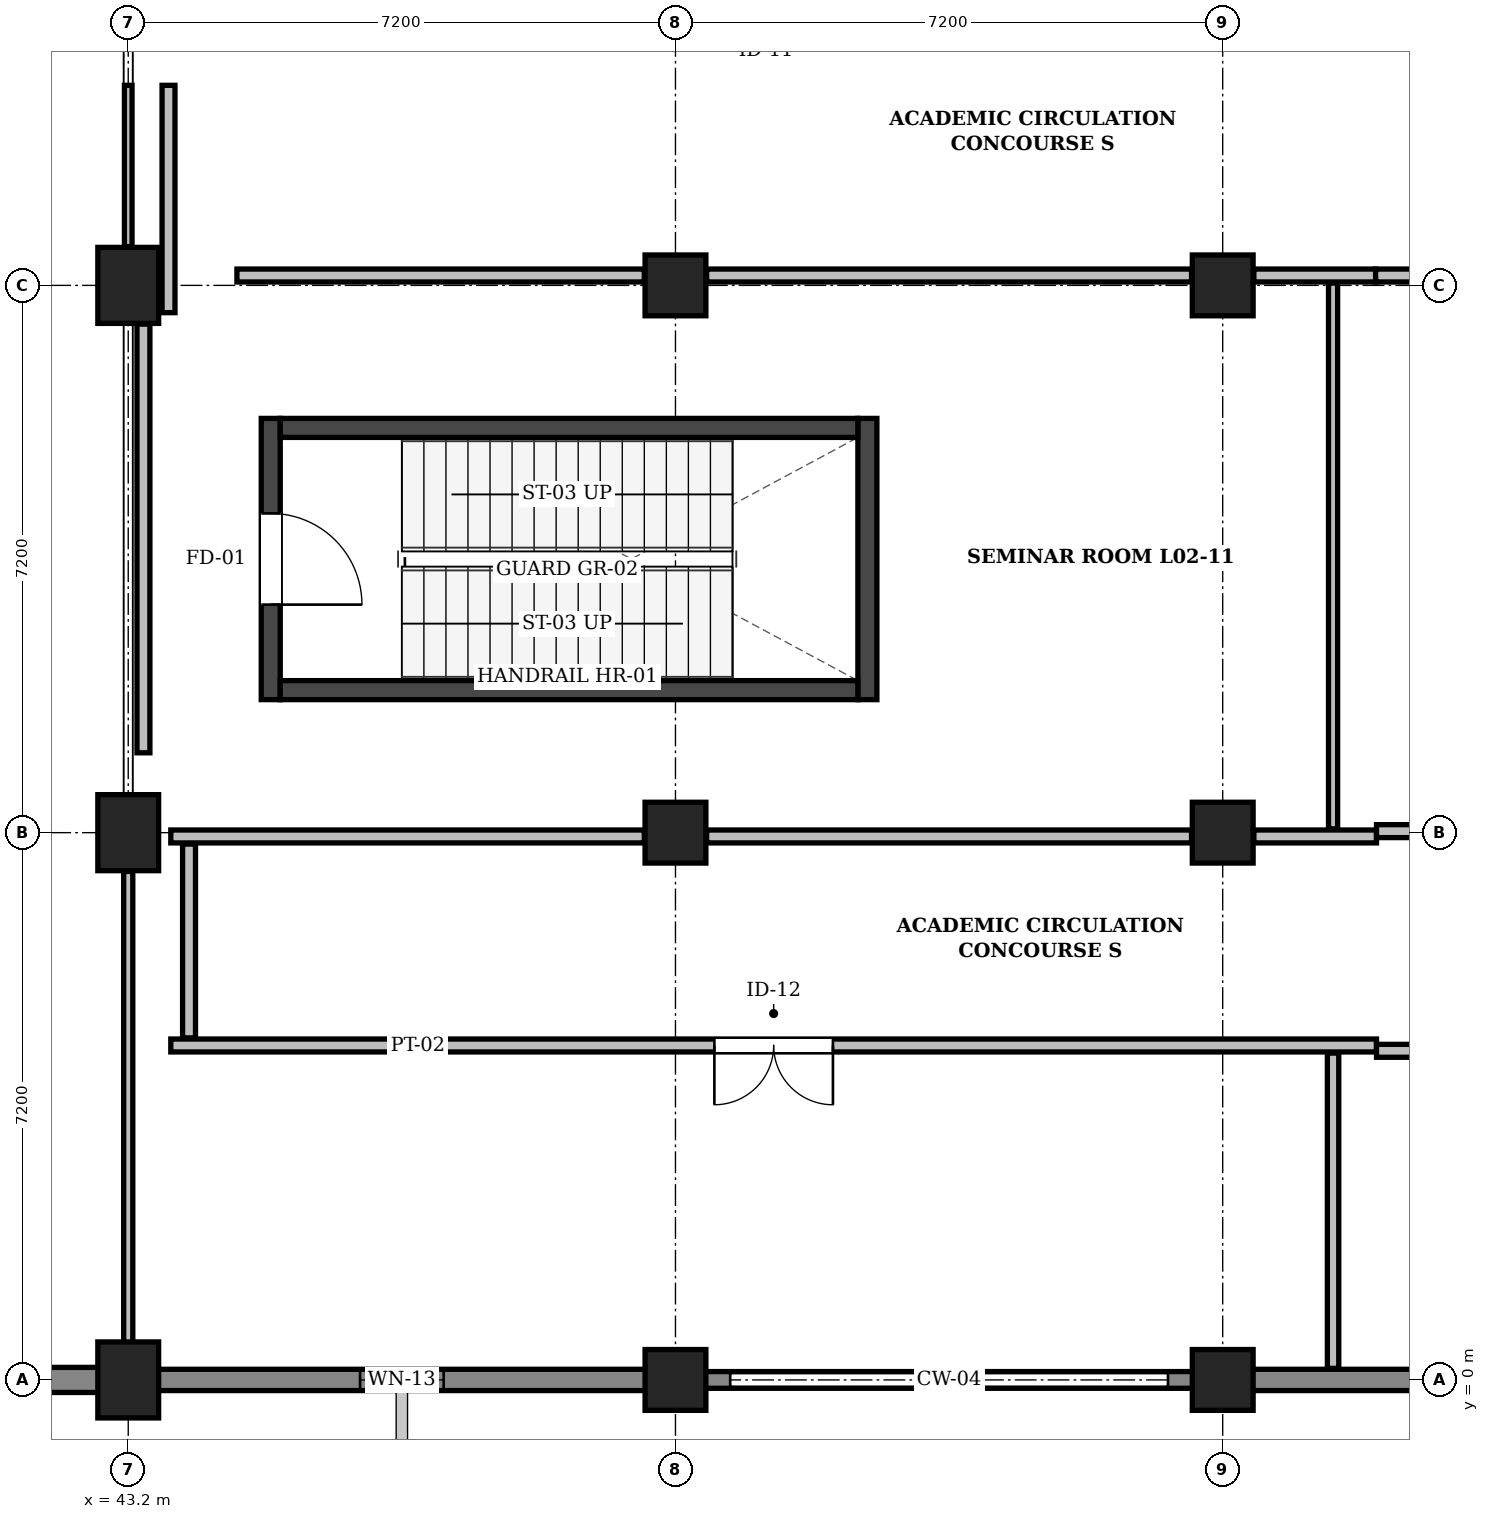
"""IFC4 building model, lengths in metres.
Left out: names, types, materials, properties, quantities, classifications, styles, units other than length and angle.
Written with IfcOpenShell. Run it as: python <this file> out.ifc"""

import sys

from ifc_helpers import new_model, si_unit, direction, frame, frame_2d, origin, origin_2d, place, context, subcontext, project, spatial, rectangle, extrude, element, fill, save


model = new_model("IFC4")
c1 = context("Model", 3, precision=1e-05, world=origin(), true_north=direction((0.0, 1.0)))
c2 = subcontext(c1, "Body", "Model", "MODEL_VIEW")
j1 = project(units=[si_unit("LENGTHUNIT", "METRE"), si_unit("PLANEANGLEUNIT", "RADIAN")], contexts=[c1])
p1 = place(None, origin())
s1 = spatial("IfcSite", under=j1, at=p1, CompositionType="ELEMENT")
p2 = place(p1, origin())
s2 = spatial("IfcBuilding", under=s1, at=p2, CompositionType="ELEMENT")
p3 = place(p2, frame((0.0, 0.0, 9.6)))
s3 = spatial("IfcBuildingStorey", under=s2, at=p3, CompositionType="ELEMENT", Elevation=9.6)
for number, where, z_axis, x_axis in (
    (1, (43.2, 0.0, 0.0), (0.0, 0.0, 1.0), (1.0, 0.0, 0.0)),
    (2, (43.2, 7.2, 0.0), (0.0, 0.0, 1.0), (1.0, 0.0, 0.0)),
    (3, (43.2, 14.4, 0.0), (0.0, 0.0, 1.0), (1.0, 0.0, 0.0)),
):
    element("IfcColumn", number, at=place(p3, frame(where, z_axis=z_axis, x_axis=x_axis)), inside=s3, PredefinedType="COLUMN", context=c2, shape_type="SweptSolid", body=[
        extrude(rectangle(XDim=0.8, YDim=1.0, at=origin_2d()), origin(), (0.0, 0.0, 1.0), 4.8),
    ])
for number, where, z_axis, x_axis in (
    (4, (50.4, 0.0, 0.0), (0.0, 0.0, 1.0), (1.0, 0.0, 0.0)),
    (5, (50.4, 7.2, 0.0), (0.0, 0.0, 1.0), (1.0, 0.0, 0.0)),
    (6, (50.4, 14.4, 0.0), (0.0, 0.0, 1.0), (1.0, 0.0, 0.0)),
    (7, (57.6, 0.0, 0.0), (0.0, 0.0, 1.0), (1.0, 0.0, 0.0)),
    (8, (57.6, 7.2, 0.0), (0.0, 0.0, 1.0), (1.0, 0.0, 0.0)),
    (9, (57.6, 14.4, 0.0), (0.0, 0.0, 1.0), (1.0, 0.0, 0.0)),
):
    element("IfcColumn", number, at=place(p3, frame(where, z_axis=z_axis, x_axis=x_axis)), inside=s3, PredefinedType="COLUMN", context=c2, shape_type="SweptSolid", body=[
        extrude(rectangle(XDim=0.8, YDim=0.8, at=origin_2d()), origin(), (0.0, 0.0, 1.0), 4.8),
    ])
p4 = place(p3, frame((64.8, 0.0, 0.0), z_axis=(0.0, 0.0, 1.0), x_axis=(-1.0, 0.0, 0.0)))
e10 = element("IfcWall", 10, at=p4, inside=s3, PredefinedType="SOLIDWALL", context=c2, shape_type="SweptSolid", body=[
    extrude(rectangle(XDim=7.2, YDim=0.28, at=frame_2d((3.6, 0.0))), origin(), (0.0, 0.0, 1.0), 4.52),
])
p5 = place(p4, frame((1.434, 0.0, 0.95)))
e11 = element("IfcOpeningElement", 11, at=p5, cuts=e10, PredefinedType="OPENING", context=c2, shape_type="SweptSolid", body=[
    extrude(rectangle(XDim=2.9, YDim=1.3, at=frame_2d((1.45, 0.65))), frame((0.0, 0.152, 0.0), z_axis=(0.0, -1.0, 0.0), x_axis=(1.0, 0.0, 0.0)), (0.0, 0.0, 1.0), 0.304),
])
p6 = place(p3, frame((57.6, 0.0, 0.0), z_axis=(0.0, 0.0, 1.0), x_axis=(-1.0, 0.0, 0.0)))
e12 = element("IfcWall", 12, at=p6, inside=s3, PredefinedType="SOLIDWALL", context=c2, shape_type="SweptSolid", body=[
    extrude(rectangle(XDim=7.2, YDim=0.22, at=frame_2d((3.6, 0.0))), origin(), (0.0, 0.0, 1.0), 1.24),
])
p7 = place(p3, frame((50.4, 0.0, 0.0), z_axis=(0.0, 0.0, 1.0), x_axis=(-1.0, 0.0, 0.0)))
e13 = element("IfcWall", 13, at=p7, inside=s3, PredefinedType="SOLIDWALL", context=c2, shape_type="SweptSolid", body=[
    extrude(rectangle(XDim=7.2, YDim=0.28, at=frame_2d((3.6, 0.0))), origin(), (0.0, 0.0, 1.0), 4.52),
])
p8 = place(p7, frame((3.05, 0.0, 0.95)))
e14 = element("IfcOpeningElement", 14, at=p8, cuts=e13, PredefinedType="OPENING", context=c2, shape_type="SweptSolid", body=[
    extrude(rectangle(XDim=1.1, YDim=1.55, at=frame_2d((0.55, 0.775))), frame((0.0, 0.152, 0.0), z_axis=(0.0, -1.0, 0.0), x_axis=(1.0, 0.0, 0.0)), (0.0, 0.0, 1.0), 0.304),
])
p9 = place(p3, frame((43.2, 0.0, 0.0), z_axis=(0.0, 0.0, 1.0), x_axis=(-1.0, 0.0, 0.0)))
e15 = element("IfcWall", 15, at=p9, inside=s3, PredefinedType="SOLIDWALL", context=c2, shape_type="SweptSolid", body=[
    extrude(rectangle(XDim=7.2, YDim=0.33, at=frame_2d((3.6, 0.0))), origin(), (0.0, 0.0, 1.0), 4.52),
])
p10 = place(p3, frame((45.075, 8.95, 0.0), z_axis=(0.0, 0.0, 1.0), x_axis=(0.0, 1.0, 0.0)))
e16 = element("IfcWall", 16, at=p10, inside=s3, PredefinedType="SHEAR", context=c2, shape_type="SweptSolid", body=[
    extrude(rectangle(XDim=3.7, YDim=0.25, at=frame_2d((1.85, 0.0))), origin(), (0.0, 0.0, 1.0), 4.55),
])
p11 = place(p10, frame((1.25, 0.0, 0.0)))
e17 = element("IfcOpeningElement", 17, at=p11, cuts=e16, PredefinedType="OPENING", context=c2, shape_type="SweptSolid", body=[
    extrude(rectangle(XDim=1.2, YDim=2.15, at=frame_2d((0.6, 1.075))), frame((0.0, 0.137, 0.0), z_axis=(0.0, -1.0, 0.0), x_axis=(1.0, 0.0, 0.0)), (0.0, 0.0, 1.0), 0.274),
])
p12 = place(p3, frame((52.925, 8.95, 0.0), z_axis=(0.0, 0.0, 1.0), x_axis=(0.0, 1.0, 0.0)))
e18 = element("IfcWall", 18, at=p12, inside=s3, PredefinedType="SHEAR", context=c2, shape_type="SweptSolid", body=[
    extrude(rectangle(XDim=3.7, YDim=0.25, at=frame_2d((1.85, 0.0))), origin(), (0.0, 0.0, 1.0), 4.55),
])
for number, where, z_axis, x_axis in (
    (19, (45.2, 9.075, 0.0), (0.0, 0.0, 1.0), (1.0, 0.0, 0.0)),
    (20, (45.2, 12.525, 0.0), (0.0, 0.0, 1.0), (1.0, 0.0, 0.0)),
):
    element("IfcWall", number, at=place(p3, frame(where, z_axis=z_axis, x_axis=x_axis)), inside=s3, PredefinedType="SHEAR", context=c2, shape_type="SweptSolid", body=[
        extrude(rectangle(XDim=7.6, YDim=0.25, at=frame_2d((3.8, 0.0))), origin(), (0.0, 0.0, 1.0), 4.55),
    ])
p13 = place(p3, frame((50.81, 14.53, 0.0), z_axis=(0.0, 0.0, 1.0), x_axis=(1.0, 0.0, 0.0)))
e21 = element("IfcWall", 21, at=p13, inside=s3, PredefinedType="PARTITIONING", context=c2, shape_type="SweptSolid", body=[
    extrude(rectangle(XDim=6.38, YDim=0.17, at=frame_2d((3.19, 0.0))), origin(), (0.0, 0.0, 1.0), 3.93),
])
p14 = place(p3, frame((44.63, 14.53, 0.0), z_axis=(0.0, 0.0, 1.0), x_axis=(1.0, 0.0, 0.0)))
e22 = element("IfcWall", 22, at=p14, inside=s3, PredefinedType="PARTITIONING", context=c2, shape_type="SweptSolid", body=[
    extrude(rectangle(XDim=5.36, YDim=0.17, at=frame_2d((2.68, 0.0))), origin(), (0.0, 0.0, 1.0), 3.93),
])
p15 = place(p3, frame((58.01, 14.53, 0.0), z_axis=(0.0, 0.0, 1.0), x_axis=(1.0, 0.0, 0.0)))
e23 = element("IfcWall", 23, at=p15, inside=s3, PredefinedType="PARTITIONING", context=c2, shape_type="SweptSolid", body=[
    extrude(rectangle(XDim=1.602, YDim=0.17, at=frame_2d((0.801, 0.0))), origin(), (0.0, 0.0, 1.0), 3.63),
])
p16 = place(p3, frame((43.73, 14.041, 0.0), z_axis=(0.0, 0.0, 1.0), x_axis=(0.0, 1.0, 0.0)))
e24 = element("IfcWall", 24, at=p16, inside=s3, PredefinedType="PARTITIONING", context=c2, shape_type="SweptSolid", body=[
    extrude(rectangle(XDim=2.991, YDim=0.17, at=frame_2d((1.496, 0.0))), origin(), (0.0, 0.0, 1.0), 4.46),
])
p17 = place(p3, frame((59.612, 14.53, 0.0), z_axis=(0.0, 0.0, 1.0), x_axis=(1.0, 0.0, 0.0)))
e25 = element("IfcWall", 25, at=p17, inside=s3, PredefinedType="PARTITIONING", context=c2, shape_type="SweptSolid", body=[
    extrude(rectangle(XDim=11.978, YDim=0.17, at=frame_2d((5.989, 0.0))), origin(), (0.0, 0.0, 1.0), 3.63),
])
p18 = place(p17, frame((5.029, 0.0, 0.0)))
e26 = element("IfcOpeningElement", 26, at=p18, cuts=e25, PredefinedType="OPENING", context=c2, shape_type="SweptSolid", body=[
    extrude(rectangle(XDim=1.92, YDim=2.32, at=frame_2d((0.96, 1.16))), frame((0.0, 0.097, 0.0), z_axis=(0.0, -1.0, 0.0), x_axis=(1.0, 0.0, 0.0)), (0.0, 0.0, 1.0), 0.194),
])
p19 = place(p3, frame((50.81, 7.15, 0.0), z_axis=(0.0, 0.0, 1.0), x_axis=(1.0, 0.0, 0.0)))
e27 = element("IfcWall", 27, at=p19, inside=s3, PredefinedType="PARTITIONING", context=c2, shape_type="SweptSolid", body=[
    extrude(rectangle(XDim=6.38, YDim=0.17, at=frame_2d((3.19, 0.0))), origin(), (0.0, 0.0, 1.0), 3.93),
])
p20 = place(p3, frame((43.76, 7.15, 0.0), z_axis=(0.0, 0.0, 1.0), x_axis=(1.0, 0.0, 0.0)))
e28 = element("IfcWall", 28, at=p20, inside=s3, PredefinedType="PARTITIONING", context=c2, shape_type="SweptSolid", body=[
    extrude(rectangle(XDim=6.23, YDim=0.17, at=frame_2d((3.115, 0.0))), origin(), (0.0, 0.0, 1.0), 3.93),
])
p21 = place(p3, frame((58.01, 7.15, 0.0), z_axis=(0.0, 0.0, 1.0), x_axis=(1.0, 0.0, 0.0)))
e29 = element("IfcWall", 29, at=p21, inside=s3, PredefinedType="PARTITIONING", context=c2, shape_type="SweptSolid", body=[
    extrude(rectangle(XDim=1.614, YDim=0.17, at=frame_2d((0.807, 0.0))), origin(), (0.0, 0.0, 1.0), 3.93),
])
p22 = place(p3, frame((43.76, 4.4, 0.0), z_axis=(0.0, 0.0, 1.0), x_axis=(1.0, 0.0, 0.0)))
e30 = element("IfcWall", 30, at=p22, inside=s3, PredefinedType="PARTITIONING", context=c2, shape_type="SweptSolid", body=[
    extrude(rectangle(XDim=15.864, YDim=0.17, at=frame_2d((7.932, 0.0))), origin(), (0.0, 0.0, 1.0), 4.46),
])
p23 = place(p22, frame((7.152, 0.0, 0.0)))
e31 = element("IfcOpeningElement", 31, at=p23, cuts=e30, PredefinedType="OPENING", context=c2, shape_type="SweptSolid", body=[
    extrude(rectangle(XDim=1.56, YDim=2.26, at=frame_2d((0.78, 1.13))), frame((0.0, 0.097, 0.0), z_axis=(0.0, -1.0, 0.0), x_axis=(1.0, 0.0, 0.0)), (0.0, 0.0, 1.0), 0.194),
])
p24 = place(p3, frame((44.0, 4.5, 0.0), z_axis=(0.0, 0.0, 1.0), x_axis=(0.0, 1.0, 0.0)))
e32 = element("IfcWall", 32, at=p24, inside=s3, PredefinedType="PARTITIONING", context=c2, shape_type="SweptSolid", body=[
    extrude(rectangle(XDim=2.55, YDim=0.17, at=frame_2d((1.275, 0.0))), origin(), (0.0, 0.0, 1.0), 4.46),
])
p25 = place(p3, frame((59.624, 4.33, 0.0), z_axis=(0.0, 0.0, 1.0), x_axis=(1.0, 0.0, 0.0)))
e33 = element("IfcWall", 33, at=p25, inside=s3, PredefinedType="PARTITIONING", context=c2, shape_type="SweptSolid", body=[
    extrude(rectangle(XDim=17.167, YDim=0.17, at=frame_2d((8.583, 0.0))), origin(), (0.0, 0.0, 1.0), 4.46),
])
p26 = place(p25, frame((7.873, 0.0, 0.0)))
e34 = element("IfcOpeningElement", 34, at=p26, cuts=e33, PredefinedType="OPENING", context=c2, shape_type="SweptSolid", body=[
    extrude(rectangle(XDim=1.42, YDim=2.24, at=frame_2d((0.71, 1.12))), frame((0.0, 0.097, 0.0), z_axis=(0.0, -1.0, 0.0), x_axis=(1.0, 0.0, 0.0)), (0.0, 0.0, 1.0), 0.194),
])
p27 = place(p3, frame((59.624, 7.22, 0.0), z_axis=(0.0, 0.0, 1.0), x_axis=(1.0, 0.0, 0.0)))
e35 = element("IfcWall", 35, at=p27, inside=s3, PredefinedType="PARTITIONING", context=c2, shape_type="SweptSolid", body=[
    extrude(rectangle(XDim=4.766, YDim=0.17, at=frame_2d((2.383, 0.0))), origin(), (0.0, 0.0, 1.0), 3.93),
])
p28 = place(p3, frame((43.4, 8.25, 0.0), z_axis=(0.0, 0.0, 1.0), x_axis=(0.0, 1.0, 0.0)))
e36 = element("IfcWall", 36, at=p28, inside=s3, PredefinedType="PARTITIONING", context=c2, shape_type="SweptSolid", body=[
    extrude(rectangle(XDim=5.639, YDim=0.17, at=frame_2d((2.82, 0.0))), origin(), (0.0, 0.0, 1.0), 4.03),
])
p29 = place(p3, frame((43.2, 0.177, 0.0), z_axis=(0.0, 0.0, 1.0), x_axis=(0.0, 1.0, 0.0)))
e37 = element("IfcWall", 37, at=p29, inside=s3, PredefinedType="PARTITIONING", context=c2, shape_type="SweptSolid", body=[
    extrude(rectangle(XDim=6.513, YDim=0.12, at=frame_2d((3.256, 0.0))), origin(), (0.0, 0.0, 1.0), 4.03),
])
p30 = place(p3, frame((43.2, 14.91, 0.0), z_axis=(0.0, 0.0, 1.0), x_axis=(0.0, 1.0, 0.0)))
e38 = element("IfcWall", 38, at=p30, inside=s3, PredefinedType="PARTITIONING", context=c2, shape_type="SweptSolid", body=[
    extrude(rectangle(XDim=2.122, YDim=0.1, at=frame_2d((1.061, 0.0))), origin(), (0.0, 0.0, 1.0), 4.03),
])
p31 = place(p3, frame((59.052, 0.152, 0.0), z_axis=(0.0, 0.0, 1.0), x_axis=(0.0, 1.0, 0.0)))
e39 = element("IfcWall", 39, at=p31, inside=s3, PredefinedType="PARTITIONING", context=c2, shape_type="SweptSolid", body=[
    extrude(rectangle(XDim=4.148, YDim=0.15, at=frame_2d((2.074, 0.0))), origin(), (0.0, 0.0, 1.0), 4.46),
])
p32 = place(p3, frame((59.052, 7.25, 0.0), z_axis=(0.0, 0.0, 1.0), x_axis=(0.0, 1.0, 0.0)))
e40 = element("IfcWall", 40, at=p32, inside=s3, PredefinedType="PARTITIONING", context=c2, shape_type="SweptSolid", body=[
    extrude(rectangle(XDim=7.18, YDim=0.12, at=frame_2d((3.59, 0.0))), origin(), (0.0, 0.0, 1.0), 4.46),
])
p33 = place(p8, origin())
e41 = element("IfcWindow", 41, at=p33, inside=s3, PartitioningType="SINGLE_PANEL", PredefinedType="WINDOW", context=c2, shape_type="SweptSolid", body=[
    extrude(rectangle(XDim=1.1, YDim=1.55, at=frame_2d((0.55, 0.775))), frame((0.0, 0.03, 0.0), z_axis=(0.0, -1.0, 0.0), x_axis=(1.0, 0.0, 0.0)), (0.0, 0.0, 1.0), 0.06),
])
fill(e14, e41)
p34 = place(p11, frame((1.2, 0.0, 0.0), z_axis=(0.0, 0.0, 1.0), x_axis=(-1.0, 0.0, 0.0)))
e42 = element("IfcDoor", 42, at=p34, inside=s3, OperationType="SINGLE_SWING_RIGHT", PredefinedType="DOOR", context=c2, shape_type="SweptSolid", body=[
    extrude(rectangle(XDim=1.2, YDim=2.15, at=frame_2d((0.6, 1.075))), frame((0.0, 0.025, 0.0), z_axis=(0.0, -1.0, 0.0), x_axis=(1.0, 0.0, 0.0)), (0.0, 0.0, 1.0), 0.05),
])
fill(e17, e42)
p35 = place(p23, frame((1.56, 0.0, 0.0), z_axis=(0.0, 0.0, 1.0), x_axis=(-1.0, 0.0, 0.0)))
e43 = element("IfcDoor", 43, at=p35, inside=s3, OperationType="DOUBLE_DOOR_SINGLE_SWING", PredefinedType="DOOR", context=c2, shape_type="SweptSolid", body=[
    extrude(rectangle(XDim=1.56, YDim=2.26, at=frame_2d((0.78, 1.13))), frame((0.0, 0.025, 0.0), z_axis=(0.0, -1.0, 0.0), x_axis=(1.0, 0.0, 0.0)), (0.0, 0.0, 1.0), 0.05),
])
fill(e31, e43)
save(model, sys.argv[1])
